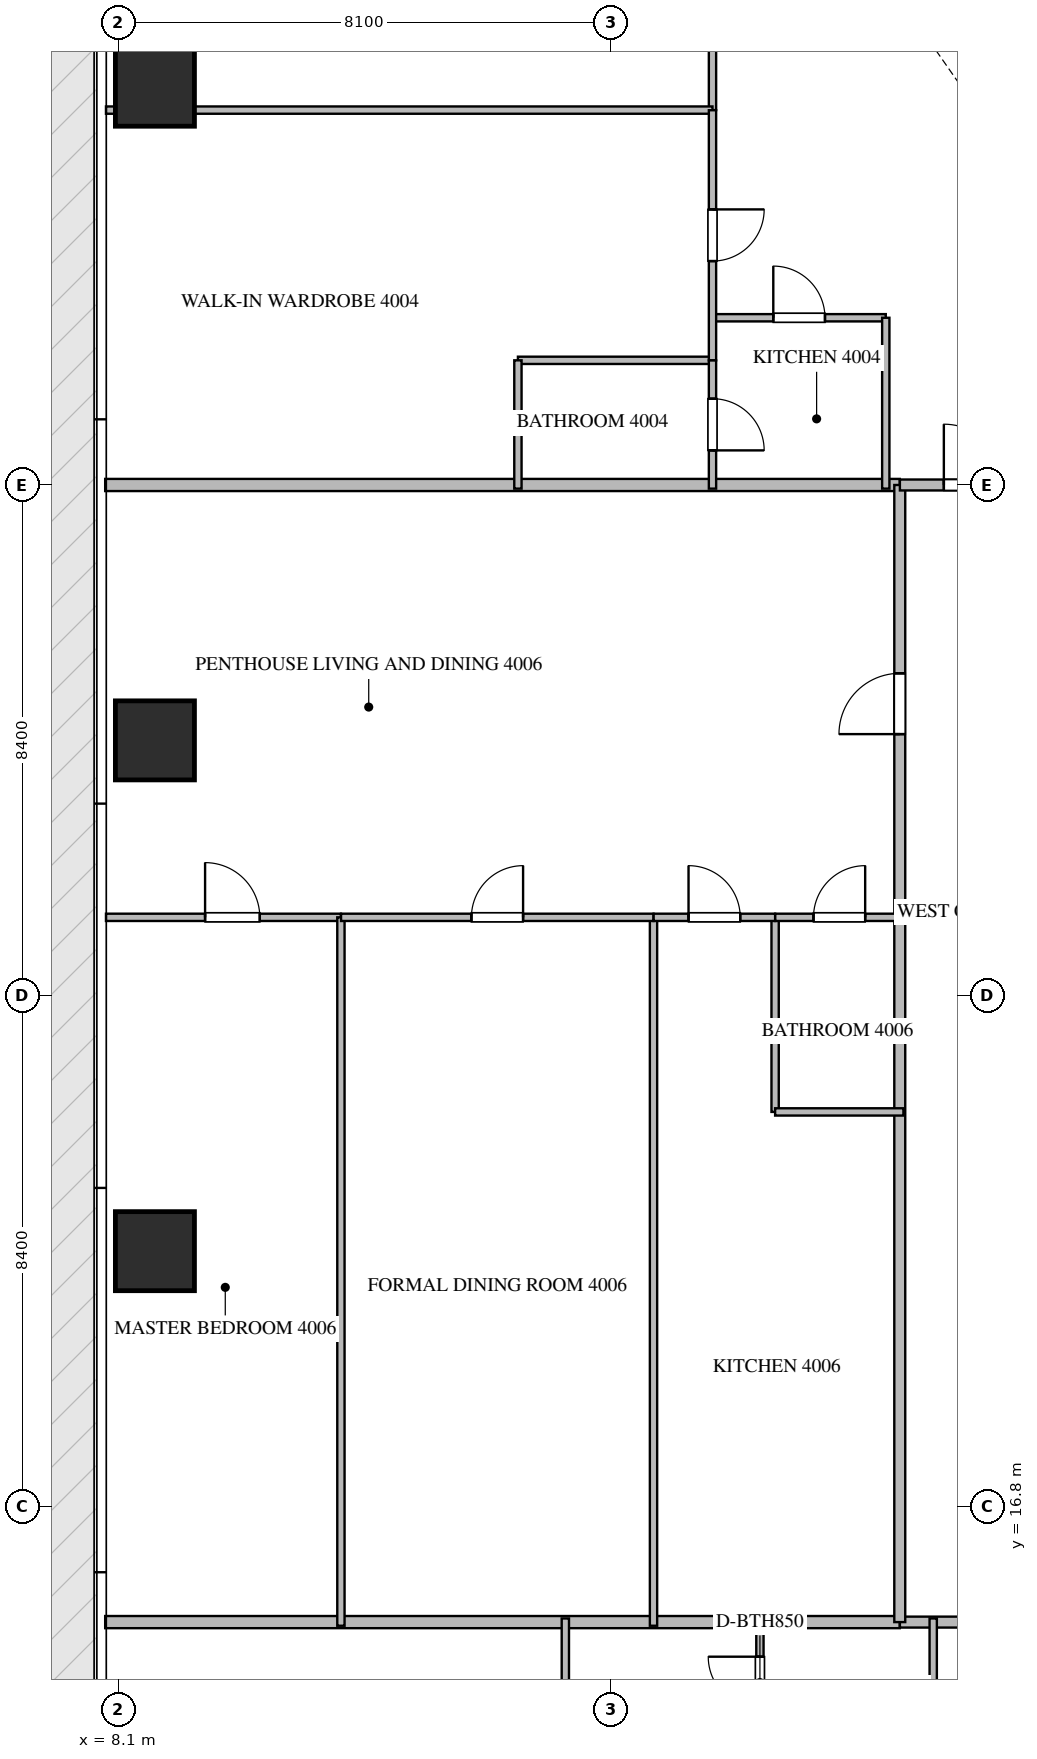
"""IFC4 building model, lengths in metres.
Left out: names, types, materials, properties, quantities, classifications, styles, units other than length and angle.
Written with IfcOpenShell. Run it as: python <this file> out.ifc"""

import sys

from ifc_helpers import new_model, si_unit, direction, frame, frame_2d, origin, origin_2d, place, context, subcontext, project, spatial, rectangle, extrude, source, transform, mapped, element, fill, save


model = new_model("IFC4")
c1 = context("Model", 3, precision=1e-05, world=origin(), true_north=direction((0.0, 1.0)))
c2 = subcontext(c1, "Body", "Model", "MODEL_VIEW")
j1 = project(units=[si_unit("LENGTHUNIT", "METRE"), si_unit("PLANEANGLEUNIT", "RADIAN")], contexts=[c1])
p1 = place(None, origin())
s1 = spatial("IfcSite", under=j1, at=p1, CompositionType="ELEMENT")
p2 = place(p1, origin())
s2 = spatial("IfcBuilding", under=s1, at=p2, CompositionType="ELEMENT")
p3 = place(p2, frame((0.0, 0.0, 161.4)))
s3 = spatial("IfcBuildingStorey", under=s2, at=p3, CompositionType="ELEMENT", Elevation=161.4)
m1 = source(origin(), c2, "Body", "SweptSolid", [
    extrude(rectangle(XDim=1.3, YDim=1.3, at=origin_2d()), origin(), (0.0, 0.0, 1.0), 3.75),
])
for number, where, z_axis, x_axis in (
    (1, (8.7, 21.0, -0.26), (0.0, 0.0, 1.0), (1.0, 0.0, 0.0)),
    (2, (8.7, 29.4, -0.26), (0.0, 0.0, 1.0), (1.0, 0.0, 0.0)),
    (3, (8.7, 40.15, -0.26), (0.0, 0.0, 1.0), (1.0, 0.0, 0.0)),
):
    element("IfcColumn", number, at=place(p3, frame(where, z_axis=z_axis, x_axis=x_axis)), inside=s3, PredefinedType="COLUMN", context=c2, shape_type="MappedRepresentation", body=[
        mapped(m1, transform((0.0, 0.0, 0.0), scale=1.0)),
    ])
for number, where, z_axis, x_axis in (
    (4, (7.882, 14.9, 0.0), (0.0, 0.0, 1.0), (1.0, 0.0, 0.0)),
    (5, (7.882, 33.6, 0.0), (0.0, 0.0, 1.0), (1.0, 0.0, 0.0)),
):
    element("IfcWall", number, at=place(p3, frame(where, z_axis=z_axis, x_axis=x_axis)), inside=s3, PredefinedType="PARTITIONING", context=c2, shape_type="SweptSolid", body=[
        extrude(rectangle(XDim=13.068, YDim=0.2, at=frame_2d((6.534, 0.0))), origin(), (0.0, 0.0, 1.0), 3.49),
    ])
p4 = place(p3, frame((20.952, 14.9, 0.0), z_axis=(0.0, 0.0, 1.0), x_axis=(1.0, 0.0, 0.0)))
e6 = element("IfcWall", 6, at=p4, inside=s3, PredefinedType="PARTITIONING", context=c2, shape_type="SweptSolid", body=[
    extrude(rectangle(XDim=22.896, YDim=0.18, at=frame_2d((11.448, 0.0))), origin(), (0.0, 0.0, 1.0), 3.49),
])
p5 = place(p4, frame((2.19, 0.0, 0.0)))
e7 = element("IfcOpeningElement", 7, at=p5, cuts=e6, PredefinedType="OPENING", context=c2, shape_type="SweptSolid", body=[
    extrude(rectangle(XDim=1.0, YDim=2.15, at=frame_2d((0.5, 1.075))), frame((0.0, 0.1, 0.0), z_axis=(0.0, -1.0, 0.0), x_axis=(1.0, 0.0, 0.0)), (0.0, 0.0, 1.0), 0.2),
])
p6 = place(p4, frame((15.24, 0.0, 0.0)))
e8 = element("IfcOpeningElement", 8, at=p6, cuts=e6, PredefinedType="OPENING", context=c2, shape_type="SweptSolid", body=[
    extrude(rectangle(XDim=1.0, YDim=2.15, at=frame_2d((0.5, 1.075))), frame((0.0, 0.1, 0.0), z_axis=(0.0, -1.0, 0.0), x_axis=(1.0, 0.0, 0.0)), (0.0, 0.0, 1.0), 0.2),
])
p7 = place(p4, frame((19.706, 0.0, 0.0)))
e9 = element("IfcOpeningElement", 9, at=p7, cuts=e6, PredefinedType="OPENING", context=c2, shape_type="SweptSolid", body=[
    extrude(rectangle(XDim=1.0, YDim=2.15, at=frame_2d((0.5, 1.075))), frame((0.0, 0.1, 0.0), z_axis=(0.0, -1.0, 0.0), x_axis=(1.0, 0.0, 0.0)), (0.0, 0.0, 1.0), 0.2),
])
p8 = place(p3, frame((20.95, 14.9, 0.0), z_axis=(0.0, 0.0, 1.0), x_axis=(0.0, 1.0, 0.0)))
e10 = element("IfcWall", 10, at=p8, inside=s3, PredefinedType="PARTITIONING", context=c2, shape_type="SweptSolid", body=[
    extrude(rectangle(XDim=18.7, YDim=0.18, at=frame_2d((9.35, 0.0))), origin(), (0.0, 0.0, 1.0), 3.49),
])
p9 = place(p8, frame((14.603, 0.0, 0.0)))
e11 = element("IfcOpeningElement", 11, at=p9, cuts=e10, PredefinedType="OPENING", context=c2, shape_type="SweptSolid", body=[
    extrude(rectangle(XDim=1.0, YDim=2.15, at=frame_2d((0.5, 1.075))), frame((0.0, 0.1, 0.0), z_axis=(0.0, -1.0, 0.0), x_axis=(1.0, 0.0, 0.0)), (0.0, 0.0, 1.0), 0.2),
])
p10 = place(p3, frame((20.952, 33.6, 0.0), z_axis=(0.0, 0.0, 1.0), x_axis=(1.0, 0.0, 0.0)))
e12 = element("IfcWall", 12, at=p10, inside=s3, PredefinedType="PARTITIONING", context=c2, shape_type="SweptSolid", body=[
    extrude(rectangle(XDim=2.446, YDim=0.18, at=frame_2d((1.223, 0.0))), origin(), (0.0, 0.0, 1.0), 3.49),
])
p11 = place(p10, frame((0.723, 0.0, 0.0)))
e13 = element("IfcOpeningElement", 13, at=p11, cuts=e12, PredefinedType="OPENING", context=c2, shape_type="SweptSolid", body=[
    extrude(rectangle(XDim=1.0, YDim=2.15, at=frame_2d((0.5, 1.075))), frame((0.0, 0.1, 0.0), z_axis=(0.0, -1.0, 0.0), x_axis=(1.0, 0.0, 0.0)), (0.0, 0.0, 1.0), 0.2),
])
p12 = place(p3, frame((21.5, 12.15, 0.0), z_axis=(0.0, 0.0, 1.0), x_axis=(0.0, 1.0, 0.0)))
e14 = element("IfcWall", 14, at=p12, inside=s3, PredefinedType="PARTITIONING", context=c2, shape_type="SweptSolid", body=[
    extrude(rectangle(XDim=2.81, YDim=0.12, at=frame_2d((1.405, 0.0))), origin(), (0.0, 0.0, 1.0), 3.49),
])
p13 = place(p3, frame((15.45, 12.85, 0.0), z_axis=(0.0, 0.0, 1.0), x_axis=(0.0, 1.0, 0.0)))
e15 = element("IfcWall", 15, at=p13, inside=s3, PredefinedType="PARTITIONING", context=c2, shape_type="SweptSolid", body=[
    extrude(rectangle(XDim=2.11, YDim=0.12, at=frame_2d((1.055, 0.0))), origin(), (0.0, 0.0, 1.0), 3.49),
])
p14 = place(p3, frame((18.65, 12.852, 0.0), z_axis=(0.0, 0.0, 1.0), x_axis=(0.0, 1.0, 0.0)))
e16 = element("IfcWall", 16, at=p14, inside=s3, PredefinedType="PARTITIONING", context=c2, shape_type="SweptSolid", body=[
    extrude(rectangle(XDim=2.108, YDim=0.12, at=frame_2d((1.054, 0.0))), origin(), (0.0, 0.0, 1.0), 3.49),
])
p15 = place(p14, frame((0.629, 0.0, 0.0)))
e17 = element("IfcOpeningElement", 17, at=p15, cuts=e16, PredefinedType="OPENING", context=c2, shape_type="SweptSolid", body=[
    extrude(rectangle(XDim=0.85, YDim=2.1, at=frame_2d((0.425, 1.05))), frame((0.0, 0.07, 0.0), z_axis=(0.0, -1.0, 0.0), x_axis=(1.0, 0.0, 0.0)), (0.0, 0.0, 1.0), 0.14),
])
p16 = place(p3, frame((17.87, 36.35, 0.0), z_axis=(0.0, 0.0, 1.0), x_axis=(1.0, 0.0, 0.0)))
e18 = element("IfcWall", 18, at=p16, inside=s3, PredefinedType="PARTITIONING", context=c2, shape_type="SweptSolid", body=[
    extrude(rectangle(XDim=2.85, YDim=0.12, at=frame_2d((1.425, 0.0))), origin(), (0.0, 0.0, 1.0), 3.49),
])
p17 = place(p16, frame((1.0, 0.0, 0.0)))
e19 = element("IfcOpeningElement", 19, at=p17, cuts=e18, PredefinedType="OPENING", context=c2, shape_type="SweptSolid", body=[
    extrude(rectangle(XDim=0.85, YDim=2.1, at=frame_2d((0.425, 1.05))), frame((0.0, 0.07, 0.0), z_axis=(0.0, -1.0, 0.0), x_axis=(1.0, 0.0, 0.0)), (0.0, 0.0, 1.0), 0.14),
])
p18 = place(p3, frame((20.72, 36.35, 0.0), z_axis=(0.0, 0.0, 1.0), x_axis=(0.0, -1.0, 0.0)))
e20 = element("IfcWall", 20, at=p18, inside=s3, PredefinedType="PARTITIONING", context=c2, shape_type="SweptSolid", body=[
    extrude(rectangle(XDim=2.81, YDim=0.12, at=frame_2d((1.405, 0.0))), origin(), (0.0, 0.0, 1.0), 3.49),
])
p19 = place(p3, frame((17.87, 48.905, 0.0), z_axis=(0.0, 0.0, 1.0), x_axis=(0.0, -1.0, 0.0)))
e21 = element("IfcWall", 21, at=p19, inside=s3, PredefinedType="PARTITIONING", context=c2, shape_type="SweptSolid", body=[
    extrude(rectangle(XDim=9.14, YDim=0.12, at=frame_2d((4.57, 0.0))), origin(), (0.0, 0.0, 1.0), 3.49),
])
p20 = place(p19, frame((4.532, 0.0, 0.0)))
e22 = element("IfcOpeningElement", 22, at=p20, cuts=e21, PredefinedType="OPENING", context=c2, shape_type="SweptSolid", body=[
    extrude(rectangle(XDim=0.9, YDim=2.1, at=frame_2d((0.45, 1.05))), frame((0.0, 0.07, 0.0), z_axis=(0.0, -1.0, 0.0), x_axis=(1.0, 0.0, 0.0)), (0.0, 0.0, 1.0), 0.14),
])
p21 = place(p3, frame((7.895, 39.765, 0.0), z_axis=(0.0, 0.0, 1.0), x_axis=(1.0, 0.0, 0.0)))
e23 = element("IfcWall", 23, at=p21, inside=s3, PredefinedType="PARTITIONING", context=c2, shape_type="SweptSolid", body=[
    extrude(rectangle(XDim=9.975, YDim=0.12, at=frame_2d((4.988, 0.0))), origin(), (0.0, 0.0, 1.0), 3.49),
])
p22 = place(p3, frame((14.67, 35.65, 0.0), z_axis=(0.0, 0.0, 1.0), x_axis=(1.0, 0.0, 0.0)))
e24 = element("IfcWall", 24, at=p22, inside=s3, PredefinedType="PARTITIONING", context=c2, shape_type="SweptSolid", body=[
    extrude(rectangle(XDim=3.2, YDim=0.12, at=frame_2d((1.6, 0.0))), origin(), (0.0, 0.0, 1.0), 3.49),
])
p23 = place(p3, frame((14.67, 35.65, 0.0), z_axis=(0.0, 0.0, 1.0), x_axis=(0.0, -1.0, 0.0)))
e25 = element("IfcWall", 25, at=p23, inside=s3, PredefinedType="PARTITIONING", context=c2, shape_type="SweptSolid", body=[
    extrude(rectangle(XDim=2.11, YDim=0.12, at=frame_2d((1.055, 0.0))), origin(), (0.0, 0.0, 1.0), 3.49),
])
p24 = place(p3, frame((17.87, 39.763, 0.0), z_axis=(0.0, 0.0, 1.0), x_axis=(0.0, -1.0, 0.0)))
e26 = element("IfcWall", 26, at=p24, inside=s3, PredefinedType="PARTITIONING", context=c2, shape_type="SweptSolid", body=[
    extrude(rectangle(XDim=4.113, YDim=0.12, at=frame_2d((2.057, 0.0))), origin(), (0.0, 0.0, 1.0), 3.49),
])
p25 = place(p24, frame((1.631, 0.0, 0.0)))
e27 = element("IfcOpeningElement", 27, at=p25, cuts=e26, PredefinedType="OPENING", context=c2, shape_type="SweptSolid", body=[
    extrude(rectangle(XDim=0.85, YDim=2.1, at=frame_2d((0.425, 1.05))), frame((0.0, 0.07, 0.0), z_axis=(0.0, -1.0, 0.0), x_axis=(1.0, 0.0, 0.0)), (0.0, 0.0, 1.0), 0.14),
])
p26 = place(p3, frame((17.87, 35.648, 0.0), z_axis=(0.0, 0.0, 1.0), x_axis=(0.0, -1.0, 0.0)))
e28 = element("IfcWall", 28, at=p26, inside=s3, PredefinedType="PARTITIONING", context=c2, shape_type="SweptSolid", body=[
    extrude(rectangle(XDim=2.108, YDim=0.12, at=frame_2d((1.054, 0.0))), origin(), (0.0, 0.0, 1.0), 3.49),
])
p27 = place(p26, frame((0.629, 0.0, 0.0)))
e29 = element("IfcOpeningElement", 29, at=p27, cuts=e28, PredefinedType="OPENING", context=c2, shape_type="SweptSolid", body=[
    extrude(rectangle(XDim=0.85, YDim=2.1, at=frame_2d((0.425, 1.05))), frame((0.0, 0.07, 0.0), z_axis=(0.0, -1.0, 0.0), x_axis=(1.0, 0.0, 0.0)), (0.0, 0.0, 1.0), 0.14),
])
p28 = place(p3, frame((7.895, 26.49, 0.0), z_axis=(0.0, 0.0, 1.0), x_axis=(1.0, 0.0, 0.0)))
e30 = element("IfcWall", 30, at=p28, inside=s3, PredefinedType="PARTITIONING", context=c2, shape_type="SweptSolid", body=[
    extrude(rectangle(XDim=3.864, YDim=0.12, at=frame_2d((1.932, 0.0))), origin(), (0.0, 0.0, 1.0), 3.49),
])
p29 = place(p28, frame((1.63, 0.0, 0.0)))
e31 = element("IfcOpeningElement", 31, at=p29, cuts=e30, PredefinedType="OPENING", context=c2, shape_type="SweptSolid", body=[
    extrude(rectangle(XDim=0.9, YDim=2.1, at=frame_2d((0.45, 1.05))), frame((0.0, 0.07, 0.0), z_axis=(0.0, -1.0, 0.0), x_axis=(1.0, 0.0, 0.0)), (0.0, 0.0, 1.0), 0.14),
])
p30 = place(p3, frame((11.759, 14.84, 0.0), z_axis=(0.0, 0.0, 1.0), x_axis=(0.0, 1.0, 0.0)))
e32 = element("IfcWall", 32, at=p30, inside=s3, PredefinedType="PARTITIONING", context=c2, shape_type="SweptSolid", body=[
    extrude(rectangle(XDim=11.65, YDim=0.12, at=frame_2d((5.825, 0.0))), origin(), (0.0, 0.0, 1.0), 3.49),
])
p31 = place(p3, frame((16.9, 14.84, 0.0), z_axis=(0.0, 0.0, 1.0), x_axis=(0.0, 1.0, 0.0)))
e33 = element("IfcWall", 33, at=p31, inside=s3, PredefinedType="PARTITIONING", context=c2, shape_type="SweptSolid", body=[
    extrude(rectangle(XDim=11.65, YDim=0.12, at=frame_2d((5.825, 0.0))), origin(), (0.0, 0.0, 1.0), 2.972),
])
p32 = place(p3, frame((18.9, 23.29, 0.0), z_axis=(0.0, 0.0, 1.0), x_axis=(0.0, 1.0, 0.0)))
e34 = element("IfcWall", 34, at=p32, inside=s3, PredefinedType="PARTITIONING", context=c2, shape_type="SweptSolid", body=[
    extrude(rectangle(XDim=3.2, YDim=0.12, at=frame_2d((1.6, 0.0))), origin(), (0.0, 0.0, 1.0), 3.49),
])
p33 = place(p3, frame((18.9, 23.29, 0.0), z_axis=(0.0, 0.0, 1.0), x_axis=(1.0, 0.0, 0.0)))
e35 = element("IfcWall", 35, at=p33, inside=s3, PredefinedType="PARTITIONING", context=c2, shape_type="SweptSolid", body=[
    extrude(rectangle(XDim=2.11, YDim=0.12, at=frame_2d((1.055, 0.0))), origin(), (0.0, 0.0, 1.0), 3.49),
])
p34 = place(p3, frame((11.761, 26.49, 0.0), z_axis=(0.0, 0.0, 1.0), x_axis=(1.0, 0.0, 0.0)))
e36 = element("IfcWall", 36, at=p34, inside=s3, PredefinedType="PARTITIONING", context=c2, shape_type="SweptSolid", body=[
    extrude(rectangle(XDim=5.139, YDim=0.12, at=frame_2d((2.569, 0.0))), origin(), (0.0, 0.0, 1.0), 3.49),
])
p35 = place(p34, frame((2.144, 0.0, 0.0)))
e37 = element("IfcOpeningElement", 37, at=p35, cuts=e36, PredefinedType="OPENING", context=c2, shape_type="SweptSolid", body=[
    extrude(rectangle(XDim=0.85, YDim=2.1, at=frame_2d((0.425, 1.05))), frame((0.0, 0.07, 0.0), z_axis=(0.0, -1.0, 0.0), x_axis=(1.0, 0.0, 0.0)), (0.0, 0.0, 1.0), 0.14),
])
p36 = place(p3, frame((16.902, 26.49, 0.0), z_axis=(0.0, 0.0, 1.0), x_axis=(1.0, 0.0, 0.0)))
e38 = element("IfcWall", 38, at=p36, inside=s3, PredefinedType="PARTITIONING", context=c2, shape_type="SweptSolid", body=[
    extrude(rectangle(XDim=1.998, YDim=0.12, at=frame_2d((0.999, 0.0))), origin(), (0.0, 0.0, 1.0), 3.49),
])
p37 = place(p36, frame((0.574, 0.0, 0.0)))
e39 = element("IfcOpeningElement", 39, at=p37, cuts=e38, PredefinedType="OPENING", context=c2, shape_type="SweptSolid", body=[
    extrude(rectangle(XDim=0.85, YDim=2.1, at=frame_2d((0.425, 1.05))), frame((0.0, 0.07, 0.0), z_axis=(0.0, -1.0, 0.0), x_axis=(1.0, 0.0, 0.0)), (0.0, 0.0, 1.0), 0.14),
])
p38 = place(p3, frame((18.902, 26.49, 0.0), z_axis=(0.0, 0.0, 1.0), x_axis=(1.0, 0.0, 0.0)))
e40 = element("IfcWall", 40, at=p38, inside=s3, PredefinedType="PARTITIONING", context=c2, shape_type="SweptSolid", body=[
    extrude(rectangle(XDim=2.108, YDim=0.12, at=frame_2d((1.054, 0.0))), origin(), (0.0, 0.0, 1.0), 3.49),
])
p39 = place(p38, frame((0.629, 0.0, 0.0)))
e41 = element("IfcOpeningElement", 41, at=p39, cuts=e40, PredefinedType="OPENING", context=c2, shape_type="SweptSolid", body=[
    extrude(rectangle(XDim=0.85, YDim=2.1, at=frame_2d((0.425, 1.05))), frame((0.0, 0.07, 0.0), z_axis=(0.0, -1.0, 0.0), x_axis=(1.0, 0.0, 0.0)), (0.0, 0.0, 1.0), 0.14),
])
m2 = source(origin(), c2, "Body", "SweptSolid", [
    extrude(rectangle(XDim=1.0, YDim=2.15, at=frame_2d((0.5, 1.075))), frame((0.0, 0.025, 0.0), z_axis=(0.0, -1.0, 0.0), x_axis=(1.0, 0.0, 0.0)), (0.0, 0.0, 1.0), 0.05),
])
p40 = place(p9, origin())
e42 = element("IfcDoor", 42, at=p40, inside=s3, OperationType="SINGLE_SWING_LEFT", PredefinedType="DOOR", context=c2, shape_type="MappedRepresentation", body=[
    mapped(m2, transform((0.0, 0.0, 0.0), scale=1.0)),
])
fill(e11, e42)
p41 = place(p11, origin())
e43 = element("IfcDoor", 43, at=p41, inside=s3, OperationType="SINGLE_SWING_LEFT", PredefinedType="DOOR", context=c2, shape_type="MappedRepresentation", body=[
    mapped(m2, transform((0.0, 0.0, 0.0), scale=1.0)),
])
fill(e13, e43)
m3 = source(origin(), c2, "Body", "SweptSolid", [
    extrude(rectangle(XDim=0.85, YDim=2.1, at=frame_2d((0.425, 1.05))), frame((0.0, 0.025, 0.0), z_axis=(0.0, -1.0, 0.0), x_axis=(1.0, 0.0, 0.0)), (0.0, 0.0, 1.0), 0.05),
])
p42 = place(p15, origin())
e44 = element("IfcDoor", 44, at=p42, inside=s3, OperationType="SINGLE_SWING_RIGHT", PredefinedType="DOOR", context=c2, shape_type="MappedRepresentation", body=[
    mapped(m3, transform((0.0, 0.0, 0.0), scale=1.0)),
])
fill(e17, e44)
p43 = place(p17, origin())
e45 = element("IfcDoor", 45, at=p43, inside=s3, OperationType="SINGLE_SWING_LEFT", PredefinedType="DOOR", context=c2, shape_type="MappedRepresentation", body=[
    mapped(m3, transform((0.0, 0.0, 0.0), scale=1.0)),
])
fill(e19, e45)
p44 = place(p25, origin())
e46 = element("IfcDoor", 46, at=p44, inside=s3, OperationType="SINGLE_SWING_LEFT", PredefinedType="DOOR", context=c2, shape_type="MappedRepresentation", body=[
    mapped(m3, transform((0.0, 0.0, 0.0), scale=1.0)),
])
fill(e27, e46)
p45 = place(p27, origin())
e47 = element("IfcDoor", 47, at=p45, inside=s3, OperationType="SINGLE_SWING_RIGHT", PredefinedType="DOOR", context=c2, shape_type="MappedRepresentation", body=[
    mapped(m3, transform((0.0, 0.0, 0.0), scale=1.0)),
])
fill(e29, e47)
m4 = source(origin(), c2, "Body", "SweptSolid", [
    extrude(rectangle(XDim=0.9, YDim=2.1, at=frame_2d((0.45, 1.05))), frame((0.0, 0.025, 0.0), z_axis=(0.0, -1.0, 0.0), x_axis=(1.0, 0.0, 0.0)), (0.0, 0.0, 1.0), 0.05),
])
p46 = place(p29, origin())
e48 = element("IfcDoor", 48, at=p46, inside=s3, OperationType="SINGLE_SWING_LEFT", PredefinedType="DOOR", context=c2, shape_type="MappedRepresentation", body=[
    mapped(m4, transform((0.0, 0.0, 0.0), scale=1.0)),
])
fill(e31, e48)
p47 = place(p35, origin())
e49 = element("IfcDoor", 49, at=p47, inside=s3, OperationType="SINGLE_SWING_RIGHT", PredefinedType="DOOR", context=c2, shape_type="MappedRepresentation", body=[
    mapped(m3, transform((0.0, 0.0, 0.0), scale=1.0)),
])
fill(e37, e49)
p48 = place(p37, origin())
e50 = element("IfcDoor", 50, at=p48, inside=s3, OperationType="SINGLE_SWING_LEFT", PredefinedType="DOOR", context=c2, shape_type="MappedRepresentation", body=[
    mapped(m3, transform((0.0, 0.0, 0.0), scale=1.0)),
])
fill(e39, e50)
p49 = place(p39, origin())
e51 = element("IfcDoor", 51, at=p49, inside=s3, OperationType="SINGLE_SWING_RIGHT", PredefinedType="DOOR", context=c2, shape_type="MappedRepresentation", body=[
    mapped(m3, transform((0.0, 0.0, 0.0), scale=1.0)),
])
fill(e41, e51)
save(model, sys.argv[1])
